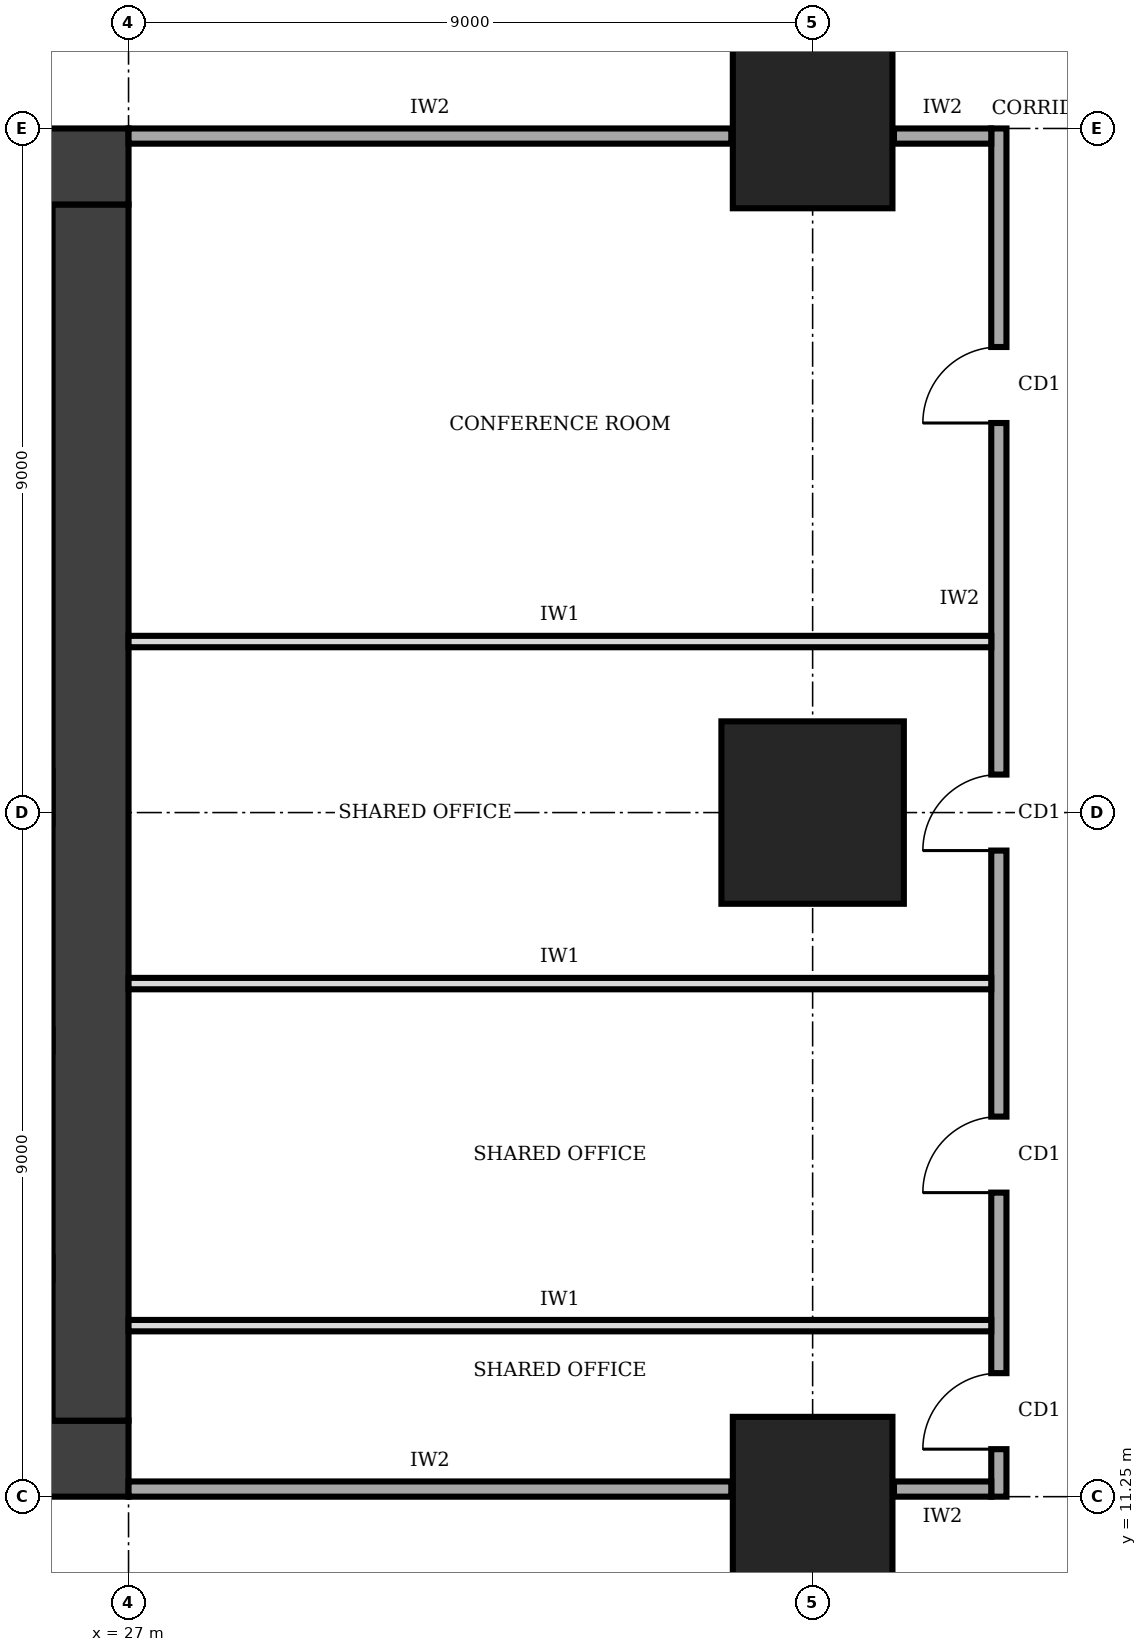
"""IFC4 building model, lengths in metres.
Left out: names, types, materials, properties, quantities, classifications, styles, units other than length and angle.
Written with IfcOpenShell. Run it as: python <this file> out.ifc"""

import sys

from ifc_helpers import new_model, si_unit, direction, frame, frame_2d, origin, origin_2d, place, context, subcontext, project, spatial, rectangle, extrude, element, fill, save


model = new_model("IFC4")
c1 = context("Model", 3, precision=1e-05, world=origin(), true_north=direction((0.0, 1.0)))
c2 = subcontext(c1, "Body", "Model", "MODEL_VIEW")
j1 = project(units=[si_unit("LENGTHUNIT", "METRE"), si_unit("PLANEANGLEUNIT", "RADIAN")], contexts=[c1])
p1 = place(None, origin())
s1 = spatial("IfcSite", under=j1, at=p1, CompositionType="ELEMENT")
p2 = place(p1, origin())
s2 = spatial("IfcBuilding", under=s1, at=p2, CompositionType="ELEMENT")
p3 = place(p2, frame((0.0, 0.0, 153.0)))
s3 = spatial("IfcBuildingStorey", under=s2, at=p3, CompositionType="ELEMENT", Elevation=153.0)
p4 = place(p3, frame((13.5, 11.75, 0.0), z_axis=(0.0, 0.0, 1.0), x_axis=(1.0, 0.0, 0.0)))
e1 = element("IfcWall", 1, at=p4, inside=s3, PredefinedType="SHEAR", context=c2, shape_type="SweptSolid", body=[
    extrude(rectangle(XDim=13.5, YDim=1.0, at=frame_2d((6.75, 0.0))), origin(), (0.0, 0.0, 1.0), 4.0),
])
p5 = place(p4, frame((4.75, 0.0, 0.0)))
e2 = element("IfcOpeningElement", 2, at=p5, cuts=e1, PredefinedType="OPENING", context=c2, shape_type="SweptSolid", body=[
    extrude(rectangle(XDim=1.0, YDim=2.1, at=frame_2d((0.5, 1.05))), frame((0.0, 0.51, 0.0), z_axis=(0.0, -1.0, 0.0), x_axis=(1.0, 0.0, 0.0)), (0.0, 0.0, 1.0), 1.02),
])
p6 = place(p3, frame((26.5, 12.25, 0.0), z_axis=(0.0, 0.0, 1.0), x_axis=(0.0, 1.0, 0.0)))
e3 = element("IfcWall", 3, at=p6, inside=s3, PredefinedType="SHEAR", context=c2, shape_type="SweptSolid", body=[
    extrude(rectangle(XDim=16.0, YDim=1.0, at=frame_2d((8.0, 0.0))), origin(), (0.0, 0.0, 1.0), 4.0),
])
p7 = place(p3, frame((27.0, 28.75, 0.0), z_axis=(0.0, 0.0, 1.0), x_axis=(-1.0, 0.0, 0.0)))
e4 = element("IfcWall", 4, at=p7, inside=s3, PredefinedType="SHEAR", context=c2, shape_type="SweptSolid", body=[
    extrude(rectangle(XDim=13.5, YDim=1.0, at=frame_2d((6.75, 0.0))), origin(), (0.0, 0.0, 1.0), 4.0),
])
p8 = place(p7, frame((4.75, 0.0, 0.0)))
e5 = element("IfcOpeningElement", 5, at=p8, cuts=e4, PredefinedType="OPENING", context=c2, shape_type="SweptSolid", body=[
    extrude(rectangle(XDim=1.8, YDim=2.1, at=frame_2d((0.9, 1.05))), frame((0.0, 0.51, 0.0), z_axis=(0.0, -1.0, 0.0), x_axis=(1.0, 0.0, 0.0)), (0.0, 0.0, 1.0), 1.02),
])
p9 = place(p3, frame((36.0, 11.25, 0.0), z_axis=(0.0, 0.0, 1.0), x_axis=(1.0, 0.0, 0.0)))
e6 = element("IfcColumn", 6, at=p9, inside=s3, PredefinedType="COLUMN", context=c2, shape_type="SweptSolid", body=[
    extrude(rectangle(XDim=2.1, YDim=2.1, at=origin_2d()), origin(), (0.0, 0.0, 1.0), 4.0),
])
p10 = place(p3, frame((36.0, 20.25, 0.0), z_axis=(0.0, 0.0, 1.0), x_axis=(1.0, 0.0, 0.0)))
e7 = element("IfcColumn", 7, at=p10, inside=s3, PredefinedType="COLUMN", context=c2, shape_type="SweptSolid", body=[
    extrude(rectangle(XDim=2.4, YDim=2.4, at=origin_2d()), origin(), (0.0, 0.0, 1.0), 4.0),
])
p11 = place(p3, frame((36.0, 29.25, 0.0), z_axis=(0.0, 0.0, 1.0), x_axis=(1.0, 0.0, 0.0)))
e8 = element("IfcColumn", 8, at=p11, inside=s3, PredefinedType="COLUMN", context=c2, shape_type="SweptSolid", body=[
    extrude(rectangle(XDim=2.1, YDim=2.1, at=origin_2d()), origin(), (0.0, 0.0, 1.0), 4.0),
])
p12 = place(p3, frame((38.45, 11.25, 0.0), z_axis=(0.0, 0.0, 1.0), x_axis=(0.0, 1.0, 0.0)))
e9 = element("IfcWall", 9, at=p12, inside=s3, PredefinedType="SOLIDWALL", context=c2, shape_type="SweptSolid", body=[
    extrude(rectangle(XDim=18.0, YDim=0.2, at=frame_2d((9.0, 0.0))), origin(), (0.0, 0.0, 1.0), 3.75),
])
p13 = place(p12, frame((0.625, 0.0, 0.0)))
e10 = element("IfcOpeningElement", 10, at=p13, cuts=e9, PredefinedType="OPENING", context=c2, shape_type="SweptSolid", body=[
    extrude(rectangle(XDim=1.0, YDim=2.1, at=frame_2d((0.5, 1.05))), frame((0.0, 0.11, 0.0), z_axis=(0.0, -1.0, 0.0), x_axis=(1.0, 0.0, 0.0)), (0.0, 0.0, 1.0), 0.22),
])
p14 = place(p12, frame((4.0, 0.0, 0.0)))
e11 = element("IfcOpeningElement", 11, at=p14, cuts=e9, PredefinedType="OPENING", context=c2, shape_type="SweptSolid", body=[
    extrude(rectangle(XDim=1.0, YDim=2.1, at=frame_2d((0.5, 1.05))), frame((0.0, 0.11, 0.0), z_axis=(0.0, -1.0, 0.0), x_axis=(1.0, 0.0, 0.0)), (0.0, 0.0, 1.0), 0.22),
])
p15 = place(p12, frame((8.5, 0.0, 0.0)))
e12 = element("IfcOpeningElement", 12, at=p15, cuts=e9, PredefinedType="OPENING", context=c2, shape_type="SweptSolid", body=[
    extrude(rectangle(XDim=1.0, YDim=2.1, at=frame_2d((0.5, 1.05))), frame((0.0, 0.11, 0.0), z_axis=(0.0, -1.0, 0.0), x_axis=(1.0, 0.0, 0.0)), (0.0, 0.0, 1.0), 0.22),
])
p16 = place(p12, frame((14.125, 0.0, 0.0)))
e13 = element("IfcOpeningElement", 13, at=p16, cuts=e9, PredefinedType="OPENING", context=c2, shape_type="SweptSolid", body=[
    extrude(rectangle(XDim=1.0, YDim=2.1, at=frame_2d((0.5, 1.05))), frame((0.0, 0.11, 0.0), z_axis=(0.0, -1.0, 0.0), x_axis=(1.0, 0.0, 0.0)), (0.0, 0.0, 1.0), 0.22),
])
p17 = place(p3, frame((27.0, 11.35, 0.0), z_axis=(0.0, 0.0, 1.0), x_axis=(1.0, 0.0, 0.0)))
e14 = element("IfcWall", 14, at=p17, inside=s3, PredefinedType="SOLIDWALL", context=c2, shape_type="SweptSolid", body=[
    extrude(rectangle(XDim=7.93, YDim=0.2, at=frame_2d((3.965, 0.0))), origin(), (0.0, 0.0, 1.0), 2.85),
])
p18 = place(p3, frame((37.07, 11.35, 0.0), z_axis=(0.0, 0.0, 1.0), x_axis=(1.0, 0.0, 0.0)))
e15 = element("IfcWall", 15, at=p18, inside=s3, PredefinedType="SOLIDWALL", context=c2, shape_type="SweptSolid", body=[
    extrude(rectangle(XDim=1.28, YDim=0.2, at=frame_2d((0.64, 0.0))), origin(), (0.0, 0.0, 1.0), 2.85),
])
p19 = place(p3, frame((27.0, 29.15, 0.0), z_axis=(0.0, 0.0, 1.0), x_axis=(1.0, 0.0, 0.0)))
e16 = element("IfcWall", 16, at=p19, inside=s3, PredefinedType="SOLIDWALL", context=c2, shape_type="SweptSolid", body=[
    extrude(rectangle(XDim=7.93, YDim=0.2, at=frame_2d((3.965, 0.0))), origin(), (0.0, 0.0, 1.0), 2.85),
])
p20 = place(p3, frame((37.07, 29.15, 0.0), z_axis=(0.0, 0.0, 1.0), x_axis=(1.0, 0.0, 0.0)))
e17 = element("IfcWall", 17, at=p20, inside=s3, PredefinedType="SOLIDWALL", context=c2, shape_type="SweptSolid", body=[
    extrude(rectangle(XDim=1.28, YDim=0.2, at=frame_2d((0.64, 0.0))), origin(), (0.0, 0.0, 1.0), 2.85),
])
for number, where, z_axis, x_axis in (
    (18, (27.0, 13.5, 0.0), (0.0, 0.0, 1.0), (1.0, 0.0, 0.0)),
    (19, (27.0, 18.0, 0.0), (0.0, 0.0, 1.0), (1.0, 0.0, 0.0)),
    (20, (27.0, 22.5, 0.0), (0.0, 0.0, 1.0), (1.0, 0.0, 0.0)),
):
    element("IfcWall", number, at=place(p3, frame(where, z_axis=z_axis, x_axis=x_axis)), inside=s3, PredefinedType="PARTITIONING", context=c2, shape_type="SweptSolid", body=[
        extrude(rectangle(XDim=11.35, YDim=0.15, at=frame_2d((5.675, 0.0))), origin(), (0.0, 0.0, 1.0), 3.75),
    ])
p21 = place(p13, origin())
e21 = element("IfcDoor", 21, at=p21, inside=s3, OperationType="SINGLE_SWING_LEFT", PredefinedType="DOOR", context=c2, shape_type="SweptSolid", body=[
    extrude(rectangle(XDim=1.0, YDim=2.1, at=frame_2d((0.5, 1.05))), frame((0.0, 0.025, 0.0), z_axis=(0.0, -1.0, 0.0), x_axis=(1.0, 0.0, 0.0)), (0.0, 0.0, 1.0), 0.05),
])
fill(e10, e21)
p22 = place(p14, origin())
e22 = element("IfcDoor", 22, at=p22, inside=s3, OperationType="SINGLE_SWING_LEFT", PredefinedType="DOOR", context=c2, shape_type="SweptSolid", body=[
    extrude(rectangle(XDim=1.0, YDim=2.1, at=frame_2d((0.5, 1.05))), frame((0.0, 0.025, 0.0), z_axis=(0.0, -1.0, 0.0), x_axis=(1.0, 0.0, 0.0)), (0.0, 0.0, 1.0), 0.05),
])
fill(e11, e22)
p23 = place(p15, origin())
e23 = element("IfcDoor", 23, at=p23, inside=s3, OperationType="SINGLE_SWING_LEFT", PredefinedType="DOOR", context=c2, shape_type="SweptSolid", body=[
    extrude(rectangle(XDim=1.0, YDim=2.1, at=frame_2d((0.5, 1.05))), frame((0.0, 0.025, 0.0), z_axis=(0.0, -1.0, 0.0), x_axis=(1.0, 0.0, 0.0)), (0.0, 0.0, 1.0), 0.05),
])
fill(e12, e23)
p24 = place(p16, origin())
e24 = element("IfcDoor", 24, at=p24, inside=s3, OperationType="SINGLE_SWING_LEFT", PredefinedType="DOOR", context=c2, shape_type="SweptSolid", body=[
    extrude(rectangle(XDim=1.0, YDim=2.1, at=frame_2d((0.5, 1.05))), frame((0.0, 0.025, 0.0), z_axis=(0.0, -1.0, 0.0), x_axis=(1.0, 0.0, 0.0)), (0.0, 0.0, 1.0), 0.05),
])
fill(e13, e24)
save(model, sys.argv[1])
